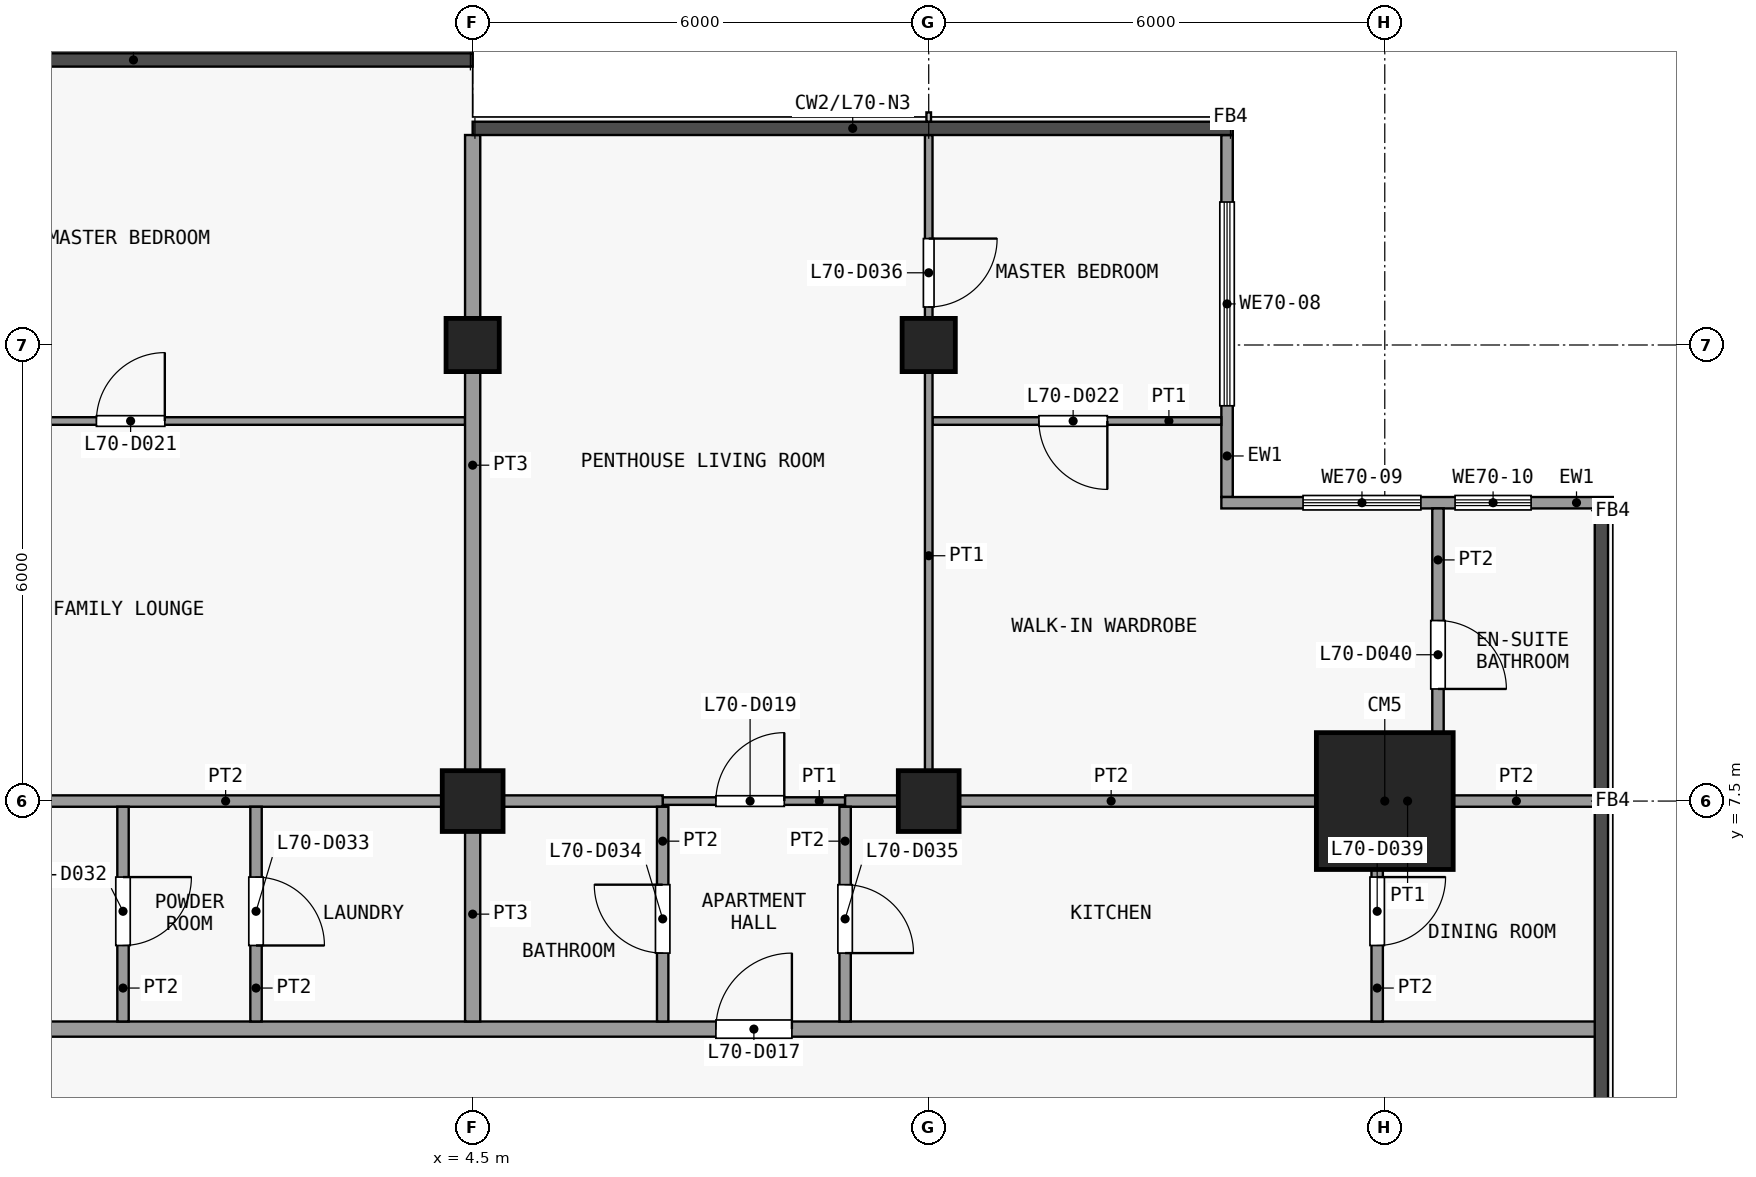
"""IFC4 building model, lengths in metres.
Left out: names, types, materials, properties, quantities, classifications, styles, units other than length and angle.
Written with IfcOpenShell. Run it as: python <this file> out.ifc"""

import sys

from ifc_helpers import new_model, si_unit, direction, frame, frame_2d, origin, origin_2d, place, context, subcontext, project, spatial, rectangle, extrude, element, fill, save


model = new_model("IFC4")
c1 = context("Model", 3, precision=1e-05, world=origin(), true_north=direction((0.0, 1.0)))
c2 = subcontext(c1, "Body", "Model", "MODEL_VIEW")
j1 = project(units=[si_unit("LENGTHUNIT", "METRE"), si_unit("PLANEANGLEUNIT", "RADIAN")], contexts=[c1])
p1 = place(None, origin())
s1 = spatial("IfcSite", under=j1, at=p1, CompositionType="ELEMENT")
p2 = place(p1, origin())
s2 = spatial("IfcBuilding", under=s1, at=p2, CompositionType="ELEMENT")
p3 = place(p2, frame((0.0, 0.0, 277.1)))
s3 = spatial("IfcBuildingStorey", under=s2, at=p3, CompositionType="ELEMENT", Elevation=277.1)
p4 = place(p3, frame((4.5, 7.5, 0.0), z_axis=(0.0, 0.0, 1.0), x_axis=(1.0, 0.0, 0.0)))
e1 = element("IfcColumn", 1, at=p4, inside=s3, PredefinedType="COLUMN", context=c2, shape_type="SweptSolid", body=[
    extrude(rectangle(XDim=0.8, YDim=0.8, at=origin_2d()), origin(), (0.0, 0.0, 1.0), 3.6),
])
p5 = place(p3, frame((4.5, 13.5, 0.0), z_axis=(0.0, 0.0, 1.0), x_axis=(1.0, 0.0, 0.0)))
e2 = element("IfcColumn", 2, at=p5, inside=s3, PredefinedType="COLUMN", context=c2, shape_type="SweptSolid", body=[
    extrude(rectangle(XDim=0.7, YDim=0.7, at=origin_2d()), origin(), (0.0, 0.0, 1.0), 3.6),
])
p6 = place(p3, frame((10.5, 7.5, 0.0), z_axis=(0.0, 0.0, 1.0), x_axis=(1.0, 0.0, 0.0)))
e3 = element("IfcColumn", 3, at=p6, inside=s3, PredefinedType="COLUMN", context=c2, shape_type="SweptSolid", body=[
    extrude(rectangle(XDim=0.8, YDim=0.8, at=origin_2d()), origin(), (0.0, 0.0, 1.0), 3.6),
])
p7 = place(p3, frame((10.5, 13.5, 0.0), z_axis=(0.0, 0.0, 1.0), x_axis=(1.0, 0.0, 0.0)))
e4 = element("IfcColumn", 4, at=p7, inside=s3, PredefinedType="COLUMN", context=c2, shape_type="SweptSolid", body=[
    extrude(rectangle(XDim=0.7, YDim=0.7, at=origin_2d()), origin(), (0.0, 0.0, 1.0), 3.6),
])
p8 = place(p3, frame((16.5, 7.5, 0.0), z_axis=(0.0, 0.0, 1.0), x_axis=(1.0, 0.0, 0.0)))
e5 = element("IfcColumn", 5, at=p8, inside=s3, PredefinedType="COLUMN", context=c2, shape_type="SweptSolid", body=[
    extrude(rectangle(XDim=1.8, YDim=1.8, at=origin_2d()), origin(), (0.0, 0.0, 1.0), 3.6),
])
p9 = place(p3, frame((14.425, 16.262, 0.0), z_axis=(0.0, 0.0, 1.0), x_axis=(0.0, -1.0, 0.0)))
e6 = element("IfcWall", 6, at=p9, inside=s3, PredefinedType="SOLIDWALL", context=c2, shape_type="SweptSolid", body=[
    extrude(rectangle(XDim=4.762, YDim=0.15, at=frame_2d((2.381, 0.0))), origin(), (0.0, 0.0, 1.0), 3.3),
])
p10 = place(p9, frame((0.881, 0.0, 0.9)))
e7 = element("IfcOpeningElement", 7, at=p10, cuts=e6, PredefinedType="OPENING", context=c2, shape_type="SweptSolid", body=[
    extrude(rectangle(XDim=2.681, YDim=2.4, at=frame_2d((1.34, 1.2))), frame((0.0, 0.085, 0.0), z_axis=(0.0, -1.0, 0.0), x_axis=(1.0, 0.0, 0.0)), (0.0, 0.0, 1.0), 0.17),
])
p11 = place(p3, frame((14.35, 11.425, 0.0), z_axis=(0.0, 0.0, 1.0), x_axis=(1.0, 0.0, 0.0)))
e8 = element("IfcWall", 8, at=p11, inside=s3, PredefinedType="SOLIDWALL", context=c2, shape_type="SweptSolid", body=[
    extrude(rectangle(XDim=5.15, YDim=0.15, at=frame_2d((2.575, 0.0))), origin(), (0.0, 0.0, 1.0), 3.3),
])
p12 = place(p11, frame((1.075, 0.0, 0.9)))
e9 = element("IfcOpeningElement", 9, at=p12, cuts=e8, PredefinedType="OPENING", context=c2, shape_type="SweptSolid", body=[
    extrude(rectangle(XDim=1.55, YDim=2.4, at=frame_2d((0.775, 1.2))), frame((0.0, 0.085, 0.0), z_axis=(0.0, -1.0, 0.0), x_axis=(1.0, 0.0, 0.0)), (0.0, 0.0, 1.0), 0.17),
])
p13 = place(p11, frame((3.075, 0.0, 0.9)))
e10 = element("IfcOpeningElement", 10, at=p13, cuts=e8, PredefinedType="OPENING", context=c2, shape_type="SweptSolid", body=[
    extrude(rectangle(XDim=1.0, YDim=2.4, at=frame_2d((0.5, 1.2))), frame((0.0, 0.085, 0.0), z_axis=(0.0, -1.0, 0.0), x_axis=(1.0, 0.0, 0.0)), (0.0, 0.0, 1.0), 0.17),
])
p14 = place(p3, frame((-19.35, 4.5, 0.0), z_axis=(0.0, 0.0, 1.0), x_axis=(1.0, 0.0, 0.0)))
e11 = element("IfcWall", 11, at=p14, inside=s3, PredefinedType="PARTITIONING", context=c2, shape_type="SweptSolid", body=[
    extrude(rectangle(XDim=38.7, YDim=0.2, at=frame_2d((19.35, 0.0))), origin(), (0.0, 0.0, 1.0), 3.3),
])
p15 = place(p14, frame((13.05, 0.0, 0.0)))
e12 = element("IfcOpeningElement", 12, at=p15, cuts=e11, PredefinedType="OPENING", context=c2, shape_type="SweptSolid", body=[
    extrude(rectangle(XDim=1.0, YDim=2.1, at=frame_2d((0.5, 1.05))), frame((0.0, 0.11, 0.0), z_axis=(0.0, -1.0, 0.0), x_axis=(1.0, 0.0, 0.0)), (0.0, 0.0, 1.0), 0.22),
])
p16 = place(p14, frame((27.05, 0.0, 0.0)))
e13 = element("IfcOpeningElement", 13, at=p16, cuts=e11, PredefinedType="OPENING", context=c2, shape_type="SweptSolid", body=[
    extrude(rectangle(XDim=1.0, YDim=2.1, at=frame_2d((0.5, 1.05))), frame((0.0, 0.11, 0.0), z_axis=(0.0, -1.0, 0.0), x_axis=(1.0, 0.0, 0.0)), (0.0, 0.0, 1.0), 0.22),
])
p17 = place(p3, frame((7.0, 7.5, 0.0), z_axis=(0.0, 0.0, 1.0), x_axis=(1.0, 0.0, 0.0)))
e14 = element("IfcWall", 14, at=p17, inside=s3, PredefinedType="PARTITIONING", context=c2, shape_type="SweptSolid", body=[
    extrude(rectangle(XDim=2.4, YDim=0.1, at=frame_2d((1.2, 0.0))), origin(), (0.0, 0.0, 1.0), 3.3),
])
p18 = place(p17, frame((0.7, 0.0, 0.0)))
e15 = element("IfcOpeningElement", 15, at=p18, cuts=e14, PredefinedType="OPENING", context=c2, shape_type="SweptSolid", body=[
    extrude(rectangle(XDim=0.9, YDim=2.1, at=frame_2d((0.45, 1.05))), frame((0.0, 0.06, 0.0), z_axis=(0.0, -1.0, 0.0), x_axis=(1.0, 0.0, 0.0)), (0.0, 0.0, 1.0), 0.12),
])
p19 = place(p3, frame((16.4, 7.5, 0.0), z_axis=(0.0, 0.0, 1.0), x_axis=(1.0, 0.0, 0.0)))
e16 = element("IfcWall", 16, at=p19, inside=s3, PredefinedType="PARTITIONING", context=c2, shape_type="SweptSolid", body=[
    extrude(rectangle(XDim=0.8, YDim=0.1, at=frame_2d((0.4, 0.0))), origin(), (0.0, 0.0, 1.0), 3.3),
])
p20 = place(p3, frame((-4.5, 7.5, 0.0), z_axis=(0.0, 0.0, 1.0), x_axis=(1.0, 0.0, 0.0)))
e17 = element("IfcWall", 17, at=p20, inside=s3, PredefinedType="PARTITIONING", context=c2, shape_type="SweptSolid", body=[
    extrude(rectangle(XDim=11.5, YDim=0.15, at=frame_2d((5.75, 0.0))), origin(), (0.0, 0.0, 1.0), 3.3),
])
p21 = place(p3, frame((9.4, 7.5, 0.0), z_axis=(0.0, 0.0, 1.0), x_axis=(1.0, 0.0, 0.0)))
e18 = element("IfcWall", 18, at=p21, inside=s3, PredefinedType="PARTITIONING", context=c2, shape_type="SweptSolid", body=[
    extrude(rectangle(XDim=7.0, YDim=0.15, at=frame_2d((3.5, 0.0))), origin(), (0.0, 0.0, 1.0), 3.3),
])
p22 = place(p3, frame((17.2, 7.5, 0.0), z_axis=(0.0, 0.0, 1.0), x_axis=(1.0, 0.0, 0.0)))
e19 = element("IfcWall", 19, at=p22, inside=s3, PredefinedType="PARTITIONING", context=c2, shape_type="SweptSolid", body=[
    extrude(rectangle(XDim=2.062, YDim=0.15, at=frame_2d((1.031, 0.0))), origin(), (0.0, 0.0, 1.0), 3.3),
])
p23 = place(p3, frame((-4.45, 12.5, 0.0), z_axis=(0.0, 0.0, 1.0), x_axis=(1.0, 0.0, 0.0)))
e20 = element("IfcWall", 20, at=p23, inside=s3, PredefinedType="PARTITIONING", context=c2, shape_type="SweptSolid", body=[
    extrude(rectangle(XDim=8.85, YDim=0.1, at=frame_2d((4.425, 0.0))), origin(), (0.0, 0.0, 1.0), 3.3),
])
p24 = place(p23, frame((4.0, 0.0, 0.0)))
e21 = element("IfcOpeningElement", 21, at=p24, cuts=e20, PredefinedType="OPENING", context=c2, shape_type="SweptSolid", body=[
    extrude(rectangle(XDim=0.9, YDim=2.1, at=frame_2d((0.45, 1.05))), frame((0.0, 0.06, 0.0), z_axis=(0.0, -1.0, 0.0), x_axis=(1.0, 0.0, 0.0)), (0.0, 0.0, 1.0), 0.12),
])
p25 = place(p3, frame((10.55, 12.5, 0.0), z_axis=(0.0, 0.0, 1.0), x_axis=(1.0, 0.0, 0.0)))
e22 = element("IfcWall", 22, at=p25, inside=s3, PredefinedType="PARTITIONING", context=c2, shape_type="SweptSolid", body=[
    extrude(rectangle(XDim=3.8, YDim=0.1, at=frame_2d((1.9, 0.0))), origin(), (0.0, 0.0, 1.0), 3.3),
])
p26 = place(p25, frame((1.4, 0.0, 0.0)))
e23 = element("IfcOpeningElement", 23, at=p26, cuts=e22, PredefinedType="OPENING", context=c2, shape_type="SweptSolid", body=[
    extrude(rectangle(XDim=0.9, YDim=2.1, at=frame_2d((0.45, 1.05))), frame((0.0, 0.06, 0.0), z_axis=(0.0, -1.0, 0.0), x_axis=(1.0, 0.0, 0.0)), (0.0, 0.0, 1.0), 0.12),
])
p27 = place(p3, frame((-0.1, 4.6, 0.0), z_axis=(0.0, 0.0, 1.0), x_axis=(0.0, 1.0, 0.0)))
e24 = element("IfcWall", 24, at=p27, inside=s3, PredefinedType="PARTITIONING", context=c2, shape_type="SweptSolid", body=[
    extrude(rectangle(XDim=2.825, YDim=0.15, at=frame_2d((1.413, 0.0))), origin(), (0.0, 0.0, 1.0), 3.3),
])
p28 = place(p27, frame((1.0, 0.0, 0.0)))
e25 = element("IfcOpeningElement", 25, at=p28, cuts=e24, PredefinedType="OPENING", context=c2, shape_type="SweptSolid", body=[
    extrude(rectangle(XDim=0.9, YDim=2.1, at=frame_2d((0.45, 1.05))), frame((0.0, 0.085, 0.0), z_axis=(0.0, -1.0, 0.0), x_axis=(1.0, 0.0, 0.0)), (0.0, 0.0, 1.0), 0.17),
])
p29 = place(p3, frame((1.65, 4.6, 0.0), z_axis=(0.0, 0.0, 1.0), x_axis=(0.0, 1.0, 0.0)))
e26 = element("IfcWall", 26, at=p29, inside=s3, PredefinedType="PARTITIONING", context=c2, shape_type="SweptSolid", body=[
    extrude(rectangle(XDim=2.825, YDim=0.15, at=frame_2d((1.413, 0.0))), origin(), (0.0, 0.0, 1.0), 3.3),
])
p30 = place(p29, frame((1.0, 0.0, 0.0)))
e27 = element("IfcOpeningElement", 27, at=p30, cuts=e26, PredefinedType="OPENING", context=c2, shape_type="SweptSolid", body=[
    extrude(rectangle(XDim=0.9, YDim=2.1, at=frame_2d((0.45, 1.05))), frame((0.0, 0.085, 0.0), z_axis=(0.0, -1.0, 0.0), x_axis=(1.0, 0.0, 0.0)), (0.0, 0.0, 1.0), 0.17),
])
p31 = place(p3, frame((4.5, 4.6, 0.0), z_axis=(0.0, 0.0, 1.0), x_axis=(0.0, 1.0, 0.0)))
e28 = element("IfcWall", 28, at=p31, inside=s3, PredefinedType="PARTITIONING", context=c2, shape_type="SweptSolid", body=[
    extrude(rectangle(XDim=2.825, YDim=0.2, at=frame_2d((1.413, 0.0))), origin(), (0.0, 0.0, 1.0), 3.3),
])
p32 = place(p3, frame((4.5, 7.575, 0.0), z_axis=(0.0, 0.0, 1.0), x_axis=(0.0, 1.0, 0.0)))
e29 = element("IfcWall", 29, at=p32, inside=s3, PredefinedType="PARTITIONING", context=c2, shape_type="SweptSolid", body=[
    extrude(rectangle(XDim=8.688, YDim=0.2, at=frame_2d((4.344, 0.0))), origin(), (0.0, 0.0, 1.0), 3.3),
])
p33 = place(p3, frame((7.0, 4.6, 0.0), z_axis=(0.0, 0.0, 1.0), x_axis=(0.0, 1.0, 0.0)))
e30 = element("IfcWall", 30, at=p33, inside=s3, PredefinedType="PARTITIONING", context=c2, shape_type="SweptSolid", body=[
    extrude(rectangle(XDim=2.825, YDim=0.15, at=frame_2d((1.413, 0.0))), origin(), (0.0, 0.0, 1.0), 3.3),
])
p34 = place(p33, frame((0.9, 0.0, 0.0)))
e31 = element("IfcOpeningElement", 31, at=p34, cuts=e30, PredefinedType="OPENING", context=c2, shape_type="SweptSolid", body=[
    extrude(rectangle(XDim=0.9, YDim=2.1, at=frame_2d((0.45, 1.05))), frame((0.0, 0.085, 0.0), z_axis=(0.0, -1.0, 0.0), x_axis=(1.0, 0.0, 0.0)), (0.0, 0.0, 1.0), 0.17),
])
p35 = place(p3, frame((9.4, 4.6, 0.0), z_axis=(0.0, 0.0, 1.0), x_axis=(0.0, 1.0, 0.0)))
e32 = element("IfcWall", 32, at=p35, inside=s3, PredefinedType="PARTITIONING", context=c2, shape_type="SweptSolid", body=[
    extrude(rectangle(XDim=2.825, YDim=0.15, at=frame_2d((1.413, 0.0))), origin(), (0.0, 0.0, 1.0), 3.3),
])
p36 = place(p35, frame((0.9, 0.0, 0.0)))
e33 = element("IfcOpeningElement", 33, at=p36, cuts=e32, PredefinedType="OPENING", context=c2, shape_type="SweptSolid", body=[
    extrude(rectangle(XDim=0.9, YDim=2.1, at=frame_2d((0.45, 1.05))), frame((0.0, 0.085, 0.0), z_axis=(0.0, -1.0, 0.0), x_axis=(1.0, 0.0, 0.0)), (0.0, 0.0, 1.0), 0.17),
])
p37 = place(p3, frame((10.5, 7.575, 0.0), z_axis=(0.0, 0.0, 1.0), x_axis=(0.0, 1.0, 0.0)))
e34 = element("IfcWall", 34, at=p37, inside=s3, PredefinedType="PARTITIONING", context=c2, shape_type="SweptSolid", body=[
    extrude(rectangle(XDim=8.688, YDim=0.1, at=frame_2d((4.344, 0.0))), origin(), (0.0, 0.0, 1.0), 3.3),
])
p38 = place(p37, frame((6.425, 0.0, 0.0)))
e35 = element("IfcOpeningElement", 35, at=p38, cuts=e34, PredefinedType="OPENING", context=c2, shape_type="SweptSolid", body=[
    extrude(rectangle(XDim=0.9, YDim=2.1, at=frame_2d((0.45, 1.05))), frame((0.0, 0.06, 0.0), z_axis=(0.0, -1.0, 0.0), x_axis=(1.0, 0.0, 0.0)), (0.0, 0.0, 1.0), 0.12),
])
p39 = place(p3, frame((16.4, 4.6, 0.0), z_axis=(0.0, 0.0, 1.0), x_axis=(0.0, 1.0, 0.0)))
e36 = element("IfcWall", 36, at=p39, inside=s3, PredefinedType="PARTITIONING", context=c2, shape_type="SweptSolid", body=[
    extrude(rectangle(XDim=2.825, YDim=0.15, at=frame_2d((1.413, 0.0))), origin(), (0.0, 0.0, 1.0), 3.3),
])
p40 = place(p39, frame((1.0, 0.0, 0.0)))
e37 = element("IfcOpeningElement", 37, at=p40, cuts=e36, PredefinedType="OPENING", context=c2, shape_type="SweptSolid", body=[
    extrude(rectangle(XDim=0.9, YDim=2.1, at=frame_2d((0.45, 1.05))), frame((0.0, 0.085, 0.0), z_axis=(0.0, -1.0, 0.0), x_axis=(1.0, 0.0, 0.0)), (0.0, 0.0, 1.0), 0.17),
])
p41 = place(p3, frame((17.2, 7.575, 0.0), z_axis=(0.0, 0.0, 1.0), x_axis=(0.0, 1.0, 0.0)))
e38 = element("IfcWall", 38, at=p41, inside=s3, PredefinedType="PARTITIONING", context=c2, shape_type="SweptSolid", body=[
    extrude(rectangle(XDim=3.775, YDim=0.15, at=frame_2d((1.888, 0.0))), origin(), (0.0, 0.0, 1.0), 3.3),
])
p42 = place(p41, frame((1.4, 0.0, 0.0)))
e39 = element("IfcOpeningElement", 39, at=p42, cuts=e38, PredefinedType="OPENING", context=c2, shape_type="SweptSolid", body=[
    extrude(rectangle(XDim=0.9, YDim=2.1, at=frame_2d((0.45, 1.05))), frame((0.0, 0.085, 0.0), z_axis=(0.0, -1.0, 0.0), x_axis=(1.0, 0.0, 0.0)), (0.0, 0.0, 1.0), 0.17),
])
p43 = place(p10, origin())
e40 = element("IfcWindow", 40, at=p43, inside=s3, PartitioningType="SINGLE_PANEL", PredefinedType="WINDOW", context=c2, shape_type="SweptSolid", body=[
    extrude(rectangle(XDim=2.681, YDim=2.4, at=frame_2d((1.34, 1.2))), frame((0.0, 0.03, 0.0), z_axis=(0.0, -1.0, 0.0), x_axis=(1.0, 0.0, 0.0)), (0.0, 0.0, 1.0), 0.06),
])
fill(e7, e40)
p44 = place(p12, origin())
e41 = element("IfcWindow", 41, at=p44, inside=s3, PartitioningType="SINGLE_PANEL", PredefinedType="WINDOW", context=c2, shape_type="SweptSolid", body=[
    extrude(rectangle(XDim=1.55, YDim=2.4, at=frame_2d((0.775, 1.2))), frame((0.0, 0.03, 0.0), z_axis=(0.0, -1.0, 0.0), x_axis=(1.0, 0.0, 0.0)), (0.0, 0.0, 1.0), 0.06),
])
fill(e9, e41)
p45 = place(p13, origin())
e42 = element("IfcWindow", 42, at=p45, inside=s3, PartitioningType="SINGLE_PANEL", PredefinedType="WINDOW", context=c2, shape_type="SweptSolid", body=[
    extrude(rectangle(XDim=1.0, YDim=2.4, at=frame_2d((0.5, 1.2))), frame((0.0, 0.03, 0.0), z_axis=(0.0, -1.0, 0.0), x_axis=(1.0, 0.0, 0.0)), (0.0, 0.0, 1.0), 0.06),
])
fill(e10, e42)
p46 = place(p16, origin())
e43 = element("IfcDoor", 43, at=p46, inside=s3, OperationType="SINGLE_SWING_LEFT", PredefinedType="DOOR", context=c2, shape_type="SweptSolid", body=[
    extrude(rectangle(XDim=1.0, YDim=2.1, at=frame_2d((0.5, 1.05))), frame((0.0, 0.025, 0.0), z_axis=(0.0, -1.0, 0.0), x_axis=(1.0, 0.0, 0.0)), (0.0, 0.0, 1.0), 0.05),
])
fill(e13, e43)
p47 = place(p18, origin())
e44 = element("IfcDoor", 44, at=p47, inside=s3, OperationType="SINGLE_SWING_LEFT", PredefinedType="DOOR", context=c2, shape_type="SweptSolid", body=[
    extrude(rectangle(XDim=0.9, YDim=2.1, at=frame_2d((0.45, 1.05))), frame((0.0, 0.025, 0.0), z_axis=(0.0, -1.0, 0.0), x_axis=(1.0, 0.0, 0.0)), (0.0, 0.0, 1.0), 0.05),
])
fill(e15, e44)
p48 = place(p24, origin())
e45 = element("IfcDoor", 45, at=p48, inside=s3, OperationType="SINGLE_SWING_LEFT", PredefinedType="DOOR", context=c2, shape_type="SweptSolid", body=[
    extrude(rectangle(XDim=0.9, YDim=2.1, at=frame_2d((0.45, 1.05))), frame((0.0, 0.025, 0.0), z_axis=(0.0, -1.0, 0.0), x_axis=(1.0, 0.0, 0.0)), (0.0, 0.0, 1.0), 0.05),
])
fill(e21, e45)
p49 = place(p26, origin())
e46 = element("IfcDoor", 46, at=p49, inside=s3, OperationType="SINGLE_SWING_RIGHT", PredefinedType="DOOR", context=c2, shape_type="SweptSolid", body=[
    extrude(rectangle(XDim=0.9, YDim=2.1, at=frame_2d((0.45, 1.05))), frame((0.0, 0.025, 0.0), z_axis=(0.0, -1.0, 0.0), x_axis=(1.0, 0.0, 0.0)), (0.0, 0.0, 1.0), 0.05),
])
fill(e23, e46)
p50 = place(p28, origin())
e47 = element("IfcDoor", 47, at=p50, inside=s3, OperationType="SINGLE_SWING_RIGHT", PredefinedType="DOOR", context=c2, shape_type="SweptSolid", body=[
    extrude(rectangle(XDim=0.9, YDim=2.1, at=frame_2d((0.45, 1.05))), frame((0.0, 0.025, 0.0), z_axis=(0.0, -1.0, 0.0), x_axis=(1.0, 0.0, 0.0)), (0.0, 0.0, 1.0), 0.05),
])
fill(e25, e47)
p51 = place(p30, origin())
e48 = element("IfcDoor", 48, at=p51, inside=s3, OperationType="SINGLE_SWING_LEFT", PredefinedType="DOOR", context=c2, shape_type="SweptSolid", body=[
    extrude(rectangle(XDim=0.9, YDim=2.1, at=frame_2d((0.45, 1.05))), frame((0.0, 0.025, 0.0), z_axis=(0.0, -1.0, 0.0), x_axis=(1.0, 0.0, 0.0)), (0.0, 0.0, 1.0), 0.05),
])
fill(e27, e48)
p52 = place(p34, origin())
e49 = element("IfcDoor", 49, at=p52, inside=s3, OperationType="SINGLE_SWING_LEFT", PredefinedType="DOOR", context=c2, shape_type="SweptSolid", body=[
    extrude(rectangle(XDim=0.9, YDim=2.1, at=frame_2d((0.45, 1.05))), frame((0.0, 0.025, 0.0), z_axis=(0.0, -1.0, 0.0), x_axis=(1.0, 0.0, 0.0)), (0.0, 0.0, 1.0), 0.05),
])
fill(e31, e49)
p53 = place(p36, origin())
e50 = element("IfcDoor", 50, at=p53, inside=s3, OperationType="SINGLE_SWING_LEFT", PredefinedType="DOOR", context=c2, shape_type="SweptSolid", body=[
    extrude(rectangle(XDim=0.9, YDim=2.1, at=frame_2d((0.45, 1.05))), frame((0.0, 0.025, 0.0), z_axis=(0.0, -1.0, 0.0), x_axis=(1.0, 0.0, 0.0)), (0.0, 0.0, 1.0), 0.05),
])
fill(e33, e50)
p54 = place(p38, origin())
e51 = element("IfcDoor", 51, at=p54, inside=s3, OperationType="SINGLE_SWING_RIGHT", PredefinedType="DOOR", context=c2, shape_type="SweptSolid", body=[
    extrude(rectangle(XDim=0.9, YDim=2.1, at=frame_2d((0.45, 1.05))), frame((0.0, 0.025, 0.0), z_axis=(0.0, -1.0, 0.0), x_axis=(1.0, 0.0, 0.0)), (0.0, 0.0, 1.0), 0.05),
])
fill(e35, e51)
p55 = place(p40, origin())
e52 = element("IfcDoor", 52, at=p55, inside=s3, OperationType="SINGLE_SWING_RIGHT", PredefinedType="DOOR", context=c2, shape_type="SweptSolid", body=[
    extrude(rectangle(XDim=0.9, YDim=2.1, at=frame_2d((0.45, 1.05))), frame((0.0, 0.025, 0.0), z_axis=(0.0, -1.0, 0.0), x_axis=(1.0, 0.0, 0.0)), (0.0, 0.0, 1.0), 0.05),
])
fill(e37, e52)
p56 = place(p42, origin())
e53 = element("IfcDoor", 53, at=p56, inside=s3, OperationType="SINGLE_SWING_LEFT", PredefinedType="DOOR", context=c2, shape_type="SweptSolid", body=[
    extrude(rectangle(XDim=0.9, YDim=2.1, at=frame_2d((0.45, 1.05))), frame((0.0, 0.025, 0.0), z_axis=(0.0, -1.0, 0.0), x_axis=(1.0, 0.0, 0.0)), (0.0, 0.0, 1.0), 0.05),
])
fill(e39, e53)
save(model, sys.argv[1])
